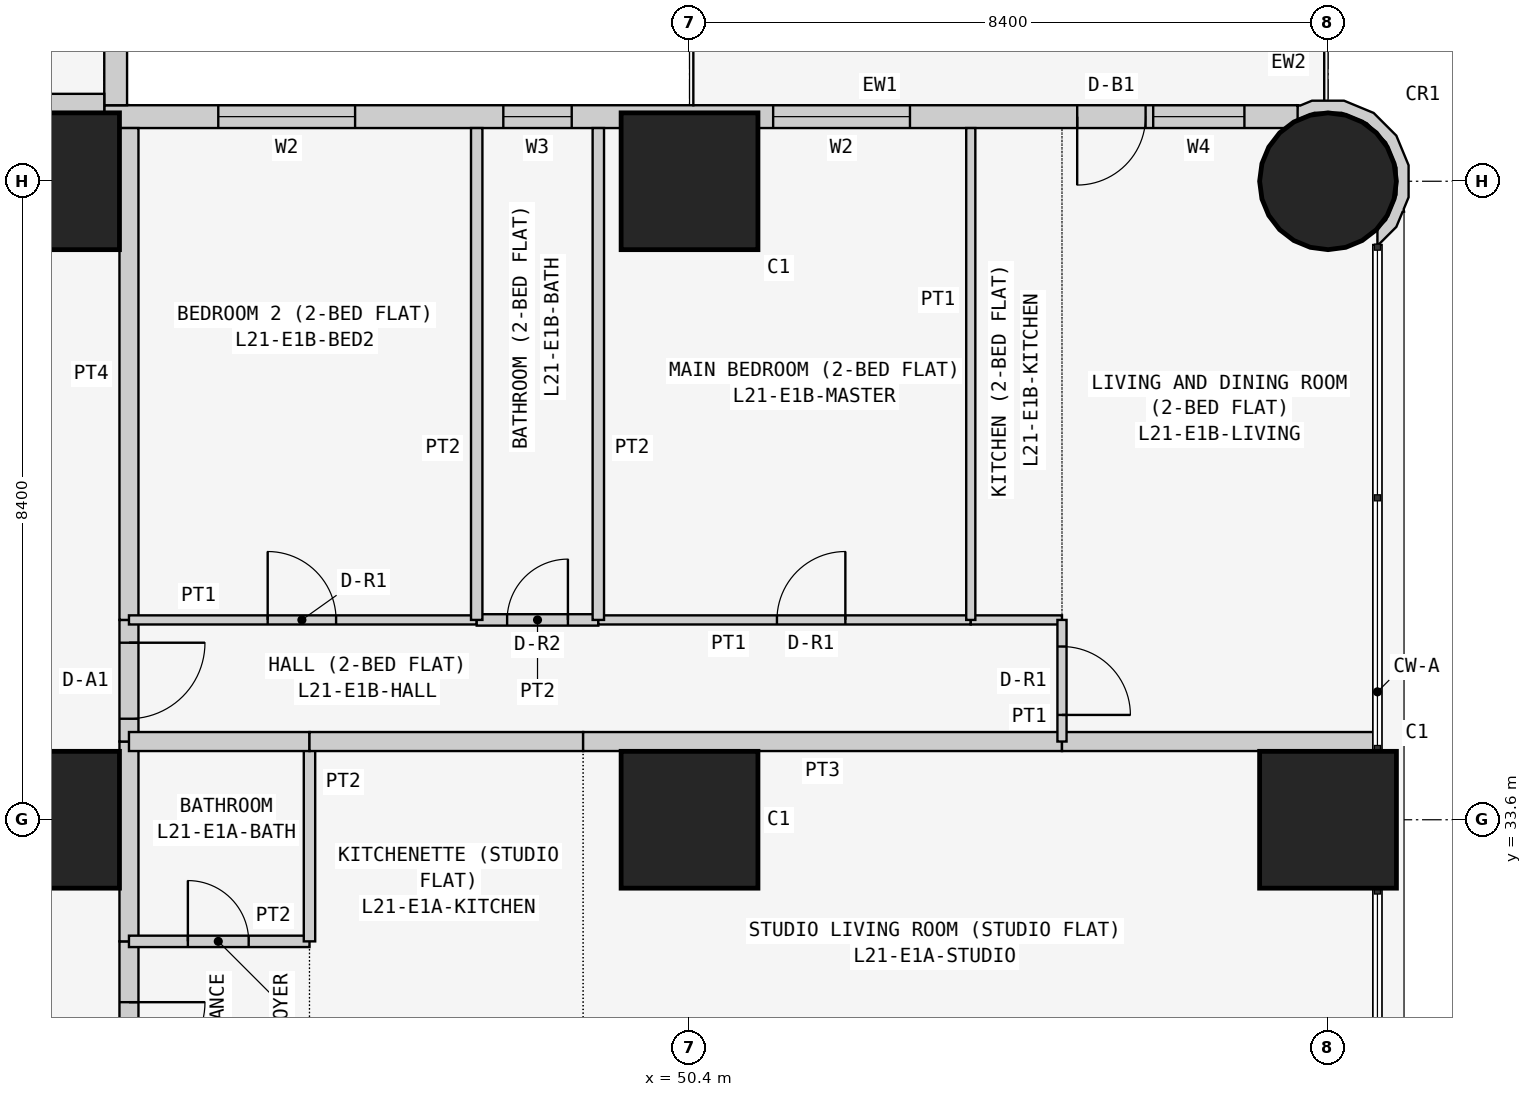
"""IFC4 building model, lengths in metres.
Left out: names, types, materials, properties, quantities, classifications, styles, units other than length and angle.
Written with IfcOpenShell. Run it as: python <this file> out.ifc"""

import sys

from ifc_helpers import new_model, si_unit, direction, frame, frame_2d, origin, origin_2d, place, context, subcontext, project, spatial, polyline, rectangle, circle, outline, extrude, element, fill, save


model = new_model("IFC4")
c1 = context("Model", 3, precision=1e-05, world=origin(), true_north=direction((0.0, 1.0)))
c2 = subcontext(c1, "Body", "Model", "MODEL_VIEW")
j1 = project(units=[si_unit("LENGTHUNIT", "METRE"), si_unit("PLANEANGLEUNIT", "RADIAN")], contexts=[c1])
p1 = place(None, origin())
s1 = spatial("IfcSite", under=j1, at=p1, CompositionType="ELEMENT")
p2 = place(p1, origin())
s2 = spatial("IfcBuilding", under=s1, at=p2, CompositionType="ELEMENT")
p3 = place(p2, frame((0.0, 0.0, 84.9)))
s3 = spatial("IfcBuildingStorey", under=s2, at=p3, CompositionType="ELEMENT", Elevation=84.9)
for number, where, z_axis, x_axis in (
    (1, (42.0, 33.6, 0.0), (0.0, 0.0, 1.0), (1.0, 0.0, 0.0)),
    (2, (42.0, 42.0, 0.0), (0.0, 0.0, 1.0), (1.0, 0.0, 0.0)),
    (3, (50.4, 33.6, 0.0), (0.0, 0.0, 1.0), (1.0, 0.0, 0.0)),
    (4, (50.4, 42.0, 0.0), (0.0, 0.0, 1.0), (1.0, 0.0, 0.0)),
    (5, (58.8, 33.6, 0.0), (0.0, 0.0, 1.0), (1.0, 0.0, 0.0)),
):
    element("IfcColumn", number, at=place(p3, frame(where, z_axis=z_axis, x_axis=x_axis)), inside=s3, PredefinedType="COLUMN", context=c2, shape_type="SweptSolid", body=[
        extrude(rectangle(XDim=1.8, YDim=1.8, at=origin_2d()), origin(), (0.0, 0.0, 1.0), 3.6),
    ])
p4 = place(p3, frame((58.8, 42.0, 0.0), z_axis=(0.0, 0.0, 1.0), x_axis=(1.0, 0.0, 0.0)))
e6 = element("IfcColumn", 6, at=p4, inside=s3, PredefinedType="COLUMN", context=c2, shape_type="SweptSolid", body=[
    extrude(circle(Radius=0.9, at=origin_2d()), origin(), (0.0, 0.0, 1.0), 3.6),
])
p5 = place(p3, frame((58.4, 42.85, 0.0), z_axis=(0.0, 0.0, 1.0), x_axis=(-1.0, 0.0, 0.0)))
e7 = element("IfcWall", 7, at=p5, inside=s3, PredefinedType="SOLIDWALL", context=c2, shape_type="SweptSolid", body=[
    extrude(rectangle(XDim=15.7, YDim=0.3, at=frame_2d((7.85, 0.0))), origin(), (0.0, 0.0, 1.0), 3.45),
])
p6 = place(p5, frame((12.4, 0.0, 0.9)))
e8 = element("IfcOpeningElement", 8, at=p6, cuts=e7, PredefinedType="OPENING", context=c2, shape_type="SweptSolid", body=[
    extrude(rectangle(XDim=1.8, YDim=1.5, at=frame_2d((0.9, 0.75))), frame((0.0, 0.16, 0.0), z_axis=(0.0, -1.0, 0.0), x_axis=(1.0, 0.0, 0.0)), (0.0, 0.0, 1.0), 0.32),
])
p7 = place(p5, frame((9.55, 0.0, 1.5)))
e9 = element("IfcOpeningElement", 9, at=p7, cuts=e7, PredefinedType="OPENING", context=c2, shape_type="SweptSolid", body=[
    extrude(rectangle(XDim=0.9, YDim=0.7, at=frame_2d((0.45, 0.35))), frame((0.0, 0.16, 0.0), z_axis=(0.0, -1.0, 0.0), x_axis=(1.0, 0.0, 0.0)), (0.0, 0.0, 1.0), 0.32),
])
p8 = place(p5, frame((5.1, 0.0, 0.9)))
e10 = element("IfcOpeningElement", 10, at=p8, cuts=e7, PredefinedType="OPENING", context=c2, shape_type="SweptSolid", body=[
    extrude(rectangle(XDim=1.8, YDim=1.5, at=frame_2d((0.9, 0.75))), frame((0.0, 0.16, 0.0), z_axis=(0.0, -1.0, 0.0), x_axis=(1.0, 0.0, 0.0)), (0.0, 0.0, 1.0), 0.32),
])
p9 = place(p5, frame((2.0, 0.0, 0.0)))
e11 = element("IfcOpeningElement", 11, at=p9, cuts=e7, PredefinedType="OPENING", context=c2, shape_type="SweptSolid", body=[
    extrude(rectangle(XDim=0.9, YDim=2.4, at=frame_2d((0.45, 1.2))), frame((0.0, 0.16, 0.0), z_axis=(0.0, -1.0, 0.0), x_axis=(1.0, 0.0, 0.0)), (0.0, 0.0, 1.0), 0.32),
])
p10 = place(p5, frame((0.7, 0.0, 0.9)))
e12 = element("IfcOpeningElement", 12, at=p10, cuts=e7, PredefinedType="OPENING", context=c2, shape_type="SweptSolid", body=[
    extrude(rectangle(XDim=1.2, YDim=1.5, at=frame_2d((0.6, 0.75))), frame((0.0, 0.16, 0.0), z_axis=(0.0, -1.0, 0.0), x_axis=(1.0, 0.0, 0.0)), (0.0, 0.0, 1.0), 0.32),
])
p11 = place(p3, frame((42.85, 43.0, 0.0), z_axis=(0.0, 0.0, 1.0), x_axis=(0.0, 1.0, 0.0)))
e13 = element("IfcWall", 13, at=p11, inside=s3, PredefinedType="SOLIDWALL", context=c2, shape_type="SweptSolid", body=[
    extrude(rectangle(XDim=15.4, YDim=0.3, at=frame_2d((7.7, 0.0))), origin(), (0.0, 0.0, 1.0), 3.45),
])
p12 = place(p11, frame((1.2, 0.0, 0.9)))
e14 = element("IfcOpeningElement", 14, at=p12, cuts=e13, PredefinedType="OPENING", context=c2, shape_type="SweptSolid", body=[
    extrude(rectangle(XDim=1.8, YDim=1.5, at=frame_2d((0.9, 0.75))), frame((0.0, 0.16, 0.0), z_axis=(0.0, -1.0, 0.0), x_axis=(1.0, 0.0, 0.0)), (0.0, 0.0, 1.0), 0.32),
])
p13 = place(p11, frame((4.95, 0.0, 1.5)))
e15 = element("IfcOpeningElement", 15, at=p13, cuts=e13, PredefinedType="OPENING", context=c2, shape_type="SweptSolid", body=[
    extrude(rectangle(XDim=0.9, YDim=0.7, at=frame_2d((0.45, 0.35))), frame((0.0, 0.16, 0.0), z_axis=(0.0, -1.0, 0.0), x_axis=(1.0, 0.0, 0.0)), (0.0, 0.0, 1.0), 0.32),
])
p14 = place(p11, frame((8.5, 0.0, 0.9)))
e16 = element("IfcOpeningElement", 16, at=p14, cuts=e13, PredefinedType="OPENING", context=c2, shape_type="SweptSolid", body=[
    extrude(rectangle(XDim=1.8, YDim=1.5, at=frame_2d((0.9, 0.75))), frame((0.0, 0.16, 0.0), z_axis=(0.0, -1.0, 0.0), x_axis=(1.0, 0.0, 0.0)), (0.0, 0.0, 1.0), 0.32),
])
p15 = place(p11, frame((12.5, 0.0, 0.0)))
e17 = element("IfcOpeningElement", 17, at=p15, cuts=e13, PredefinedType="OPENING", context=c2, shape_type="SweptSolid", body=[
    extrude(rectangle(XDim=0.9, YDim=2.4, at=frame_2d((0.45, 1.2))), frame((0.0, 0.16, 0.0), z_axis=(0.0, -1.0, 0.0), x_axis=(1.0, 0.0, 0.0)), (0.0, 0.0, 1.0), 0.32),
])
p16 = place(p11, frame((13.5, 0.0, 0.9)))
e18 = element("IfcOpeningElement", 18, at=p16, cuts=e13, PredefinedType="OPENING", context=c2, shape_type="SweptSolid", body=[
    extrude(rectangle(XDim=1.2, YDim=1.5, at=frame_2d((0.6, 0.75))), frame((0.0, 0.16, 0.0), z_axis=(0.0, -1.0, 0.0), x_axis=(1.0, 0.0, 0.0)), (0.0, 0.0, 1.0), 0.32),
])
p17 = place(p3, frame((59.411, 41.233, 0.0), z_axis=(0.0, 0.0, 1.0), x_axis=(0.926129809145, 0.377204953059, 0.0)))
e19 = element("IfcWall", 19, at=p17, inside=s3, PredefinedType="SOLIDWALL", context=c2, shape_type="SweptSolid", body=[
    extrude(outline(polyline([(0.626, 0.345), (0.785, 0.736), (0.782, 1.157), (0.619, 1.546), (0.319, 1.843), (-0.072, 2.002), (-0.24, 2.001), (-0.27, 2.017), (-0.37, 1.841), (-0.102, 1.842), (0.23, 1.707), (0.485, 1.455), (0.624, 1.125), (0.626, 0.766), (0.491, 0.434), (0.238, 0.179), (0.09, 0.117), (0.011, -0.078), (0.024, -0.083), (0.329, 0.045), (0.48, 0.198), (0.499, 0.193), (0.508, 0.225), (0.626, 0.345)])), origin(), (0.0, 0.0, 1.0), 3.45),
])
p18 = place(p3, frame((36.229, 43.025, 0.0), z_axis=(0.0, 0.0, 1.0), x_axis=(1.0, 0.0, 0.0)))
e20 = element("IfcWall", 20, at=p18, inside=s3, PredefinedType="PARTITIONING", context=c2, shape_type="SweptSolid", body=[
    extrude(rectangle(XDim=6.471, YDim=0.25, at=frame_2d((3.235, 0.0))), origin(), (0.0, 0.0, 1.0), 3.45),
])
p19 = place(p3, frame((43.025, 32.0, 0.0), z_axis=(0.0, 0.0, 1.0), x_axis=(0.0, -1.0, 0.0)))
e21 = element("IfcWall", 21, at=p19, inside=s3, PredefinedType="PARTITIONING", context=c2, shape_type="SweptSolid", body=[
    extrude(rectangle(XDim=2.6, YDim=0.25, at=frame_2d((1.3, 0.0))), origin(), (0.0, 0.0, 1.0), 3.45),
])
p20 = place(p19, frame((0.8, 0.0, 0.0)))
e22 = element("IfcOpeningElement", 22, at=p20, cuts=e21, PredefinedType="OPENING", context=c2, shape_type="SweptSolid", body=[
    extrude(rectangle(XDim=1.0, YDim=2.1, at=frame_2d((0.5, 1.05))), frame((0.0, 0.135, 0.0), z_axis=(0.0, -1.0, 0.0), x_axis=(1.0, 0.0, 0.0)), (0.0, 0.0, 1.0), 0.27),
])
p21 = place(p3, frame((43.025, 34.629, 0.0), z_axis=(0.0, 0.0, 1.0), x_axis=(0.0, -1.0, 0.0)))
e23 = element("IfcWall", 23, at=p21, inside=s3, PredefinedType="PARTITIONING", context=c2, shape_type="SweptSolid", body=[
    extrude(rectangle(XDim=2.629, YDim=0.25, at=frame_2d((1.314, 0.0))), origin(), (0.0, 0.0, 1.0), 3.45),
])
p22 = place(p3, frame((43.025, 36.229, 0.0), z_axis=(0.0, 0.0, 1.0), x_axis=(0.0, -1.0, 0.0)))
e24 = element("IfcWall", 24, at=p22, inside=s3, PredefinedType="PARTITIONING", context=c2, shape_type="SweptSolid", body=[
    extrude(rectangle(XDim=1.6, YDim=0.25, at=frame_2d((0.8, 0.0))), origin(), (0.0, 0.0, 1.0), 3.45),
])
p23 = place(p22, frame((0.3, 0.0, 0.0)))
e25 = element("IfcOpeningElement", 25, at=p23, cuts=e24, PredefinedType="OPENING", context=c2, shape_type="SweptSolid", body=[
    extrude(rectangle(XDim=1.0, YDim=2.1, at=frame_2d((0.5, 1.05))), frame((0.0, 0.135, 0.0), z_axis=(0.0, -1.0, 0.0), x_axis=(1.0, 0.0, 0.0)), (0.0, 0.0, 1.0), 0.27),
])
p24 = place(p3, frame((43.025, 42.7, 0.0), z_axis=(0.0, 0.0, 1.0), x_axis=(0.0, -1.0, 0.0)))
e26 = element("IfcWall", 26, at=p24, inside=s3, PredefinedType="PARTITIONING", context=c2, shape_type="SweptSolid", body=[
    extrude(rectangle(XDim=6.471, YDim=0.25, at=frame_2d((3.235, 0.0))), origin(), (0.0, 0.0, 1.0), 3.45),
])
p25 = place(p3, frame((45.4, 32.0, 0.0), z_axis=(0.0, 0.0, 1.0), x_axis=(-1.0, 0.0, 0.0)))
e27 = element("IfcWall", 27, at=p25, inside=s3, PredefinedType="PARTITIONING", context=c2, shape_type="SweptSolid", body=[
    extrude(rectangle(XDim=2.375, YDim=0.15, at=frame_2d((1.188, 0.0))), origin(), (0.0, 0.0, 1.0), 3.45),
])
p26 = place(p25, frame((0.8, 0.0, 0.0)))
e28 = element("IfcOpeningElement", 28, at=p26, cuts=e27, PredefinedType="OPENING", context=c2, shape_type="SweptSolid", body=[
    extrude(rectangle(XDim=0.8, YDim=2.1, at=frame_2d((0.4, 1.05))), frame((0.0, 0.085, 0.0), z_axis=(0.0, -1.0, 0.0), x_axis=(1.0, 0.0, 0.0)), (0.0, 0.0, 1.0), 0.17),
])
p27 = place(p3, frame((45.4, 32.0, 0.0), z_axis=(0.0, 0.0, 1.0), x_axis=(0.0, 1.0, 0.0)))
e29 = element("IfcWall", 29, at=p27, inside=s3, PredefinedType="PARTITIONING", context=c2, shape_type="SweptSolid", body=[
    extrude(rectangle(XDim=2.629, YDim=0.15, at=frame_2d((1.314, 0.0))), origin(), (0.0, 0.0, 1.0), 3.45),
])
p28 = place(p3, frame((45.4, 34.629, 0.0), z_axis=(0.0, 0.0, 1.0), x_axis=(-1.0, 0.0, 0.0)))
e30 = element("IfcWall", 30, at=p28, inside=s3, PredefinedType="PARTITIONING", context=c2, shape_type="SweptSolid", body=[
    extrude(rectangle(XDim=2.375, YDim=0.25, at=frame_2d((1.188, 0.0))), origin(), (0.0, 0.0, 1.0), 3.45),
])
p29 = place(p3, frame((49.0, 34.629, 0.0), z_axis=(0.0, 0.0, 1.0), x_axis=(-1.0, 0.0, 0.0)))
e31 = element("IfcWall", 31, at=p29, inside=s3, PredefinedType="PARTITIONING", context=c2, shape_type="SweptSolid", body=[
    extrude(rectangle(XDim=3.6, YDim=0.25, at=frame_2d((1.8, 0.0))), origin(), (0.0, 0.0, 1.0), 3.45),
])
p30 = place(p3, frame((55.3, 34.629, 0.0), z_axis=(0.0, 0.0, 1.0), x_axis=(-1.0, 0.0, 0.0)))
e32 = element("IfcWall", 32, at=p30, inside=s3, PredefinedType="PARTITIONING", context=c2, shape_type="SweptSolid", body=[
    extrude(rectangle(XDim=6.3, YDim=0.25, at=frame_2d((3.15, 0.0))), origin(), (0.0, 0.0, 1.0), 3.45),
])
p31 = place(p3, frame((59.45, 34.629, 0.0), z_axis=(0.0, 0.0, 1.0), x_axis=(-1.0, 0.0, 0.0)))
e33 = element("IfcWall", 33, at=p31, inside=s3, PredefinedType="PARTITIONING", context=c2, shape_type="SweptSolid", body=[
    extrude(rectangle(XDim=4.15, YDim=0.25, at=frame_2d((2.075, 0.0))), origin(), (0.0, 0.0, 1.0), 3.45),
])
p32 = place(p3, frame((47.6, 36.229, 0.0), z_axis=(0.0, 0.0, 1.0), x_axis=(-1.0, 0.0, 0.0)))
e34 = element("IfcWall", 34, at=p32, inside=s3, PredefinedType="PARTITIONING", context=c2, shape_type="SweptSolid", body=[
    extrude(rectangle(XDim=4.575, YDim=0.12, at=frame_2d((2.288, 0.0))), origin(), (0.0, 0.0, 1.0), 3.45),
])
p33 = place(p32, frame((1.85, 0.0, 0.0)))
e35 = element("IfcOpeningElement", 35, at=p33, cuts=e34, PredefinedType="OPENING", context=c2, shape_type="SweptSolid", body=[
    extrude(rectangle(XDim=0.9, YDim=2.1, at=frame_2d((0.45, 1.05))), frame((0.0, 0.07, 0.0), z_axis=(0.0, -1.0, 0.0), x_axis=(1.0, 0.0, 0.0)), (0.0, 0.0, 1.0), 0.14),
])
p34 = place(p3, frame((49.2, 36.229, 0.0), z_axis=(0.0, 0.0, 1.0), x_axis=(-1.0, 0.0, 0.0)))
e36 = element("IfcWall", 36, at=p34, inside=s3, PredefinedType="PARTITIONING", context=c2, shape_type="SweptSolid", body=[
    extrude(rectangle(XDim=1.6, YDim=0.15, at=frame_2d((0.8, 0.0))), origin(), (0.0, 0.0, 1.0), 3.45),
])
p35 = place(p34, frame((0.4, 0.0, 0.0)))
e37 = element("IfcOpeningElement", 37, at=p35, cuts=e36, PredefinedType="OPENING", context=c2, shape_type="SweptSolid", body=[
    extrude(rectangle(XDim=0.8, YDim=2.1, at=frame_2d((0.4, 1.05))), frame((0.0, 0.085, 0.0), z_axis=(0.0, -1.0, 0.0), x_axis=(1.0, 0.0, 0.0)), (0.0, 0.0, 1.0), 0.17),
])
p36 = place(p3, frame((54.1, 36.229, 0.0), z_axis=(0.0, 0.0, 1.0), x_axis=(-1.0, 0.0, 0.0)))
e38 = element("IfcWall", 38, at=p36, inside=s3, PredefinedType="PARTITIONING", context=c2, shape_type="SweptSolid", body=[
    extrude(rectangle(XDim=4.9, YDim=0.12, at=frame_2d((2.45, 0.0))), origin(), (0.0, 0.0, 1.0), 3.45),
])
p37 = place(p36, frame((1.65, 0.0, 0.0)))
e39 = element("IfcOpeningElement", 39, at=p37, cuts=e38, PredefinedType="OPENING", context=c2, shape_type="SweptSolid", body=[
    extrude(rectangle(XDim=0.9, YDim=2.1, at=frame_2d((0.45, 1.05))), frame((0.0, 0.07, 0.0), z_axis=(0.0, -1.0, 0.0), x_axis=(1.0, 0.0, 0.0)), (0.0, 0.0, 1.0), 0.14),
])
p38 = place(p3, frame((55.3, 36.229, 0.0), z_axis=(0.0, 0.0, 1.0), x_axis=(-1.0, 0.0, 0.0)))
e40 = element("IfcWall", 40, at=p38, inside=s3, PredefinedType="PARTITIONING", context=c2, shape_type="SweptSolid", body=[
    extrude(rectangle(XDim=1.2, YDim=0.12, at=frame_2d((0.6, 0.0))), origin(), (0.0, 0.0, 1.0), 3.45),
])
p39 = place(p3, frame((55.3, 34.629, 0.0), z_axis=(0.0, 0.0, 1.0), x_axis=(0.0, 1.0, 0.0)))
e41 = element("IfcWall", 41, at=p39, inside=s3, PredefinedType="PARTITIONING", context=c2, shape_type="SweptSolid", body=[
    extrude(rectangle(XDim=1.6, YDim=0.12, at=frame_2d((0.8, 0.0))), origin(), (0.0, 0.0, 1.0), 3.45),
])
p40 = place(p39, frame((0.35, 0.0, 0.0)))
e42 = element("IfcOpeningElement", 42, at=p40, cuts=e41, PredefinedType="OPENING", context=c2, shape_type="SweptSolid", body=[
    extrude(rectangle(XDim=0.9, YDim=2.1, at=frame_2d((0.45, 1.05))), frame((0.0, 0.07, 0.0), z_axis=(0.0, -1.0, 0.0), x_axis=(1.0, 0.0, 0.0)), (0.0, 0.0, 1.0), 0.14),
])
for number, where, z_axis, x_axis in (
    (43, (47.6, 36.229, 0.0), (0.0, 0.0, 1.0), (0.0, 1.0, 0.0)),
    (44, (49.2, 36.229, 0.0), (0.0, 0.0, 1.0), (0.0, 1.0, 0.0)),
):
    element("IfcWall", number, at=place(p3, frame(where, z_axis=z_axis, x_axis=x_axis)), inside=s3, PredefinedType="PARTITIONING", context=c2, shape_type="SweptSolid", body=[
        extrude(rectangle(XDim=6.471, YDim=0.15, at=frame_2d((3.235, 0.0))), origin(), (0.0, 0.0, 1.0), 3.45),
    ])
p41 = place(p3, frame((54.1, 36.229, 0.0), z_axis=(0.0, 0.0, 1.0), x_axis=(0.0, 1.0, 0.0)))
e45 = element("IfcWall", 45, at=p41, inside=s3, PredefinedType="PARTITIONING", context=c2, shape_type="SweptSolid", body=[
    extrude(rectangle(XDim=6.471, YDim=0.12, at=frame_2d((3.235, 0.0))), origin(), (0.0, 0.0, 1.0), 3.45),
])
p42 = place(p6, origin())
e46 = element("IfcWindow", 46, at=p42, inside=s3, PartitioningType="SINGLE_PANEL", PredefinedType="WINDOW", context=c2, shape_type="SweptSolid", body=[
    extrude(rectangle(XDim=1.8, YDim=1.5, at=frame_2d((0.9, 0.75))), frame((0.0, 0.03, 0.0), z_axis=(0.0, -1.0, 0.0), x_axis=(1.0, 0.0, 0.0)), (0.0, 0.0, 1.0), 0.06),
])
fill(e8, e46)
p43 = place(p7, origin())
e47 = element("IfcWindow", 47, at=p43, inside=s3, PartitioningType="SINGLE_PANEL", PredefinedType="WINDOW", context=c2, shape_type="SweptSolid", body=[
    extrude(rectangle(XDim=0.9, YDim=0.7, at=frame_2d((0.45, 0.35))), frame((0.0, 0.03, 0.0), z_axis=(0.0, -1.0, 0.0), x_axis=(1.0, 0.0, 0.0)), (0.0, 0.0, 1.0), 0.06),
])
fill(e9, e47)
p44 = place(p8, origin())
e48 = element("IfcWindow", 48, at=p44, inside=s3, PartitioningType="SINGLE_PANEL", PredefinedType="WINDOW", context=c2, shape_type="SweptSolid", body=[
    extrude(rectangle(XDim=1.8, YDim=1.5, at=frame_2d((0.9, 0.75))), frame((0.0, 0.03, 0.0), z_axis=(0.0, -1.0, 0.0), x_axis=(1.0, 0.0, 0.0)), (0.0, 0.0, 1.0), 0.06),
])
fill(e10, e48)
p45 = place(p9, origin())
e49 = element("IfcDoor", 49, at=p45, inside=s3, OperationType="SINGLE_SWING_RIGHT", PredefinedType="DOOR", context=c2, shape_type="SweptSolid", body=[
    extrude(rectangle(XDim=0.9, YDim=2.4, at=frame_2d((0.45, 1.2))), frame((0.0, 0.025, 0.0), z_axis=(0.0, -1.0, 0.0), x_axis=(1.0, 0.0, 0.0)), (0.0, 0.0, 1.0), 0.05),
])
fill(e11, e49)
p46 = place(p10, origin())
e50 = element("IfcWindow", 50, at=p46, inside=s3, PartitioningType="SINGLE_PANEL", PredefinedType="WINDOW", context=c2, shape_type="SweptSolid", body=[
    extrude(rectangle(XDim=1.2, YDim=1.5, at=frame_2d((0.6, 0.75))), frame((0.0, 0.03, 0.0), z_axis=(0.0, -1.0, 0.0), x_axis=(1.0, 0.0, 0.0)), (0.0, 0.0, 1.0), 0.06),
])
fill(e12, e50)
p47 = place(p20, origin())
e51 = element("IfcDoor", 51, at=p47, inside=s3, OperationType="SINGLE_SWING_LEFT", PredefinedType="DOOR", context=c2, shape_type="SweptSolid", body=[
    extrude(rectangle(XDim=1.0, YDim=2.1, at=frame_2d((0.5, 1.05))), frame((0.0, 0.025, 0.0), z_axis=(0.0, -1.0, 0.0), x_axis=(1.0, 0.0, 0.0)), (0.0, 0.0, 1.0), 0.05),
])
fill(e22, e51)
p48 = place(p26, frame((0.8, 0.0, 0.0), z_axis=(0.0, 0.0, 1.0), x_axis=(-1.0, 0.0, 0.0)))
e52 = element("IfcDoor", 52, at=p48, inside=s3, OperationType="SINGLE_SWING_LEFT", PredefinedType="DOOR", context=c2, shape_type="SweptSolid", body=[
    extrude(rectangle(XDim=0.8, YDim=2.1, at=frame_2d((0.4, 1.05))), frame((0.0, 0.025, 0.0), z_axis=(0.0, -1.0, 0.0), x_axis=(1.0, 0.0, 0.0)), (0.0, 0.0, 1.0), 0.05),
])
fill(e28, e52)
p49 = place(p23, origin())
e53 = element("IfcDoor", 53, at=p49, inside=s3, OperationType="SINGLE_SWING_LEFT", PredefinedType="DOOR", context=c2, shape_type="SweptSolid", body=[
    extrude(rectangle(XDim=1.0, YDim=2.1, at=frame_2d((0.5, 1.05))), frame((0.0, 0.025, 0.0), z_axis=(0.0, -1.0, 0.0), x_axis=(1.0, 0.0, 0.0)), (0.0, 0.0, 1.0), 0.05),
])
fill(e25, e53)
p50 = place(p33, frame((0.9, 0.0, 0.0), z_axis=(0.0, 0.0, 1.0), x_axis=(-1.0, 0.0, 0.0)))
e54 = element("IfcDoor", 54, at=p50, inside=s3, OperationType="SINGLE_SWING_LEFT", PredefinedType="DOOR", context=c2, shape_type="SweptSolid", body=[
    extrude(rectangle(XDim=0.9, YDim=2.1, at=frame_2d((0.45, 1.05))), frame((0.0, 0.025, 0.0), z_axis=(0.0, -1.0, 0.0), x_axis=(1.0, 0.0, 0.0)), (0.0, 0.0, 1.0), 0.05),
])
fill(e35, e54)
p51 = place(p35, frame((0.8, 0.0, 0.0), z_axis=(0.0, 0.0, 1.0), x_axis=(-1.0, 0.0, 0.0)))
e55 = element("IfcDoor", 55, at=p51, inside=s3, OperationType="SINGLE_SWING_RIGHT", PredefinedType="DOOR", context=c2, shape_type="SweptSolid", body=[
    extrude(rectangle(XDim=0.8, YDim=2.1, at=frame_2d((0.4, 1.05))), frame((0.0, 0.025, 0.0), z_axis=(0.0, -1.0, 0.0), x_axis=(1.0, 0.0, 0.0)), (0.0, 0.0, 1.0), 0.05),
])
fill(e37, e55)
p52 = place(p37, frame((0.9, 0.0, 0.0), z_axis=(0.0, 0.0, 1.0), x_axis=(-1.0, 0.0, 0.0)))
e56 = element("IfcDoor", 56, at=p52, inside=s3, OperationType="SINGLE_SWING_RIGHT", PredefinedType="DOOR", context=c2, shape_type="SweptSolid", body=[
    extrude(rectangle(XDim=0.9, YDim=2.1, at=frame_2d((0.45, 1.05))), frame((0.0, 0.025, 0.0), z_axis=(0.0, -1.0, 0.0), x_axis=(1.0, 0.0, 0.0)), (0.0, 0.0, 1.0), 0.05),
])
fill(e39, e56)
p53 = place(p40, frame((0.9, 0.0, 0.0), z_axis=(0.0, 0.0, 1.0), x_axis=(-1.0, 0.0, 0.0)))
e57 = element("IfcDoor", 57, at=p53, inside=s3, OperationType="SINGLE_SWING_RIGHT", PredefinedType="DOOR", context=c2, shape_type="SweptSolid", body=[
    extrude(rectangle(XDim=0.9, YDim=2.1, at=frame_2d((0.45, 1.05))), frame((0.0, 0.025, 0.0), z_axis=(0.0, -1.0, 0.0), x_axis=(1.0, 0.0, 0.0)), (0.0, 0.0, 1.0), 0.05),
])
fill(e42, e57)
save(model, sys.argv[1])
